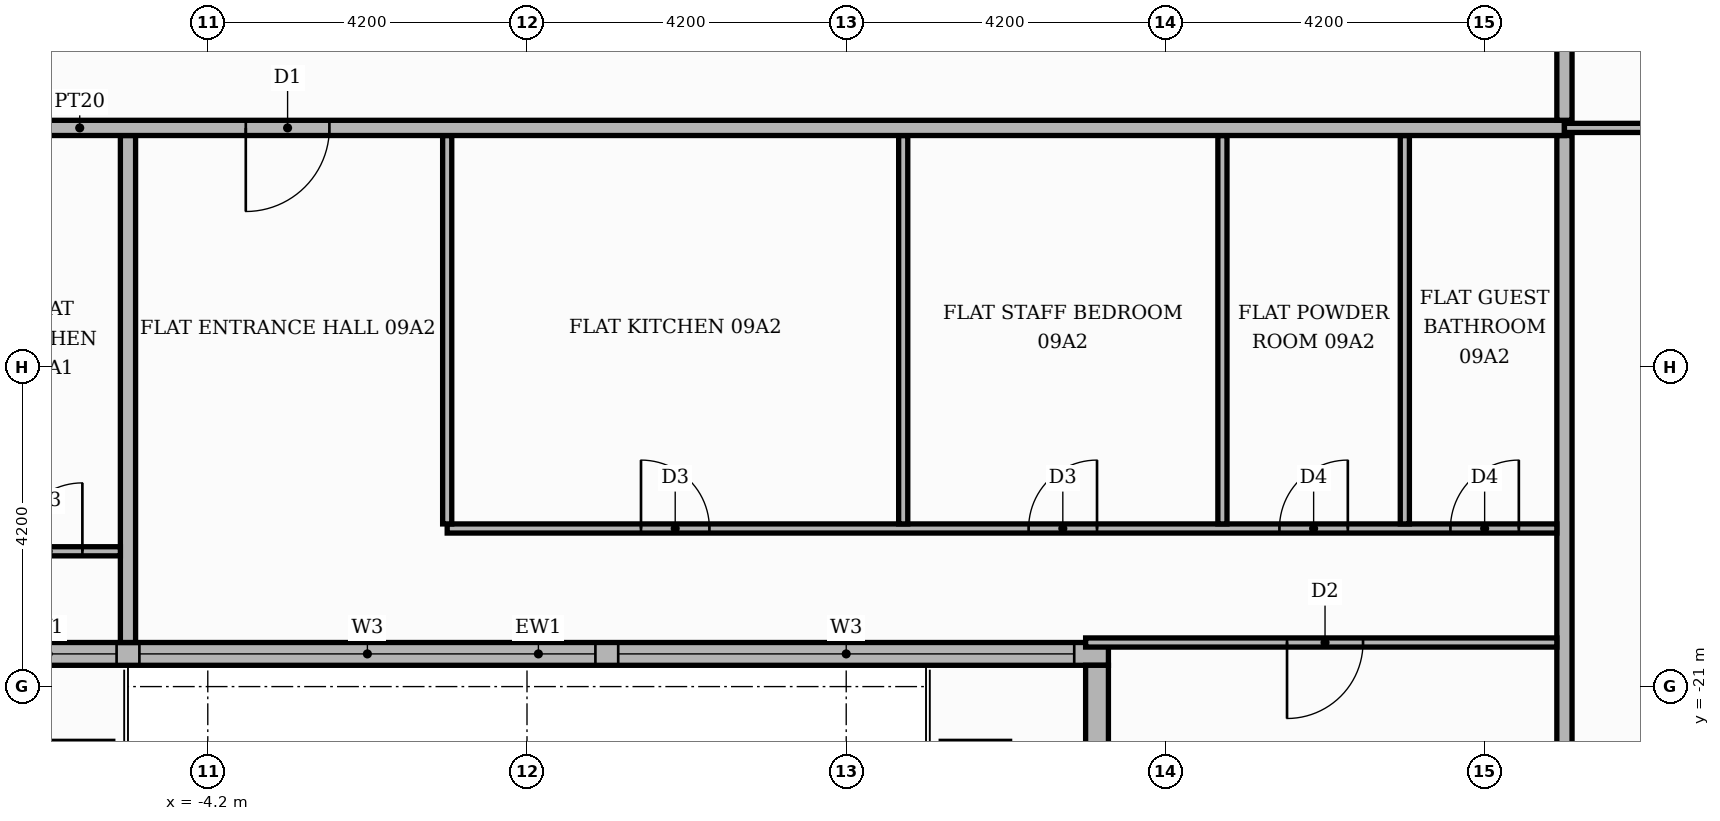
"""IFC4 building model, lengths in metres.
Left out: names, types, materials, properties, quantities, classifications, styles, units other than length and angle.
Written with IfcOpenShell. Run it as: python <this file> out.ifc"""

import sys

from ifc_helpers import new_model, si_unit, direction, frame, frame_2d, origin, place, context, subcontext, project, spatial, rectangle, extrude, element, fill, save


model = new_model("IFC4")
c1 = context("Model", 3, precision=1e-05, world=origin(), true_north=direction((0.0, 1.0)))
c2 = subcontext(c1, "Body", "Model", "MODEL_VIEW")
j1 = project(units=[si_unit("LENGTHUNIT", "METRE"), si_unit("PLANEANGLEUNIT", "RADIAN")], contexts=[c1])
p1 = place(None, origin())
s1 = spatial("IfcSite", under=j1, at=p1, CompositionType="ELEMENT")
p2 = place(p1, origin())
s2 = spatial("IfcBuilding", under=s1, at=p2, CompositionType="ELEMENT")
p3 = place(p2, frame((0.0, 0.0, 42.6)))
s3 = spatial("IfcBuildingStorey", under=s2, at=p3, CompositionType="ELEMENT", Elevation=42.6)
p4 = place(p3, frame((-7.35, -20.57, 0.0), z_axis=(0.0, 0.0, 1.0), x_axis=(1.0, 0.0, 0.0)))
e1 = element("IfcWall", 1, at=p4, inside=s3, PredefinedType="STANDARD", context=c2, shape_type="SweptSolid", body=[
    extrude(rectangle(XDim=15.0, YDim=0.3, at=frame_2d((7.5, 0.0))), origin(), (0.0, 0.0, 1.0), 3.48),
])
p5 = place(p4, frame((0.15, 0.0, 0.9)))
e2 = element("IfcOpeningElement", 2, at=p5, cuts=e1, PredefinedType="OPENING", context=c2, shape_type="SweptSolid", body=[
    extrude(rectangle(XDim=1.8, YDim=2.1, at=frame_2d((0.9, 1.05))), frame((0.0, 0.16, 0.0), z_axis=(0.0, -1.0, 0.0), x_axis=(1.0, 0.0, 0.0)), (0.0, 0.0, 1.0), 0.32),
])
p6 = place(p4, frame((2.25, 0.0, 0.9)))
e3 = element("IfcOpeningElement", 3, at=p6, cuts=e1, PredefinedType="OPENING", context=c2, shape_type="SweptSolid", body=[
    extrude(rectangle(XDim=6.0, YDim=2.1, at=frame_2d((3.0, 1.05))), frame((0.0, 0.16, 0.0), z_axis=(0.0, -1.0, 0.0), x_axis=(1.0, 0.0, 0.0)), (0.0, 0.0, 1.0), 0.32),
])
p7 = place(p4, frame((8.55, 0.0, 0.9)))
e4 = element("IfcOpeningElement", 4, at=p7, cuts=e1, PredefinedType="OPENING", context=c2, shape_type="SweptSolid", body=[
    extrude(rectangle(XDim=6.0, YDim=2.1, at=frame_2d((3.0, 1.05))), frame((0.0, 0.16, 0.0), z_axis=(0.0, -1.0, 0.0), x_axis=(1.0, 0.0, 0.0)), (0.0, 0.0, 1.0), 0.32),
])
p8 = place(p3, frame((7.5, -20.72, 0.0), z_axis=(0.0, 0.0, 1.0), x_axis=(0.0, -1.0, 0.0)))
e5 = element("IfcWall", 5, at=p8, inside=s3, PredefinedType="STANDARD", context=c2, shape_type="SweptSolid", body=[
    extrude(rectangle(XDim=5.0, YDim=0.3, at=frame_2d((2.5, 0.0))), origin(), (0.0, 0.0, 1.0), 3.48),
])
p9 = place(p8, frame((1.48, 0.0, 0.0)))
e6 = element("IfcOpeningElement", 6, at=p9, cuts=e5, PredefinedType="OPENING", context=c2, shape_type="SweptSolid", body=[
    extrude(rectangle(XDim=1.8, YDim=2.4, at=frame_2d((0.9, 1.2))), frame((0.0, 0.16, 0.0), z_axis=(0.0, -1.0, 0.0), x_axis=(1.0, 0.0, 0.0)), (0.0, 0.0, 1.0), 0.32),
])
p10 = place(p3, frame((13.65, -25.42, 0.0), z_axis=(0.0, 0.0, 1.0), x_axis=(0.0, 1.0, 0.0)))
e7 = element("IfcWall", 7, at=p10, inside=s3, PredefinedType="PARTITIONING", context=c2, shape_type="SweptSolid", body=[
    extrude(rectangle(XDim=11.67, YDim=0.2, at=frame_2d((5.835, 0.0))), origin(), (0.0, 0.0, 1.0), 3.48),
])
p11 = place(p3, frame((-5.25, -20.42, 0.0), z_axis=(0.0, 0.0, 1.0), x_axis=(0.0, 1.0, 0.0)))
e8 = element("IfcWall", 8, at=p11, inside=s3, PredefinedType="PARTITIONING", context=c2, shape_type="SweptSolid", body=[
    extrude(rectangle(XDim=6.67, YDim=0.2, at=frame_2d((3.335, 0.0))), origin(), (0.0, 0.0, 1.0), 3.48),
])
p12 = place(p3, frame((7.35, -20.42, 0.0), z_axis=(0.0, 0.0, 1.0), x_axis=(1.0, 0.0, 0.0)))
e9 = element("IfcWall", 9, at=p12, inside=s3, PredefinedType="PARTITIONING", context=c2, shape_type="SweptSolid", body=[
    extrude(rectangle(XDim=6.2, YDim=0.12, at=frame_2d((3.1, 0.0))), origin(), (0.0, 0.0, 1.0), 3.48),
])
p13 = place(p12, frame((2.65, 0.0, 0.0)))
e10 = element("IfcOpeningElement", 10, at=p13, cuts=e9, PredefinedType="OPENING", context=c2, shape_type="SweptSolid", body=[
    extrude(rectangle(XDim=1.0, YDim=2.1, at=frame_2d((0.5, 1.05))), frame((0.0, 0.07, 0.0), z_axis=(0.0, -1.0, 0.0), x_axis=(1.0, 0.0, 0.0)), (0.0, 0.0, 1.0), 0.14),
])
p14 = place(p3, frame((-9.45, -19.22, 0.0), z_axis=(0.0, 0.0, 1.0), x_axis=(1.0, 0.0, 0.0)))
e11 = element("IfcWall", 11, at=p14, inside=s3, PredefinedType="PARTITIONING", context=c2, shape_type="SweptSolid", body=[
    extrude(rectangle(XDim=4.1, YDim=0.12, at=frame_2d((2.05, 0.0))), origin(), (0.0, 0.0, 1.0), 3.48),
])
p15 = place(p14, frame((2.7, 0.0, 0.0)))
e12 = element("IfcOpeningElement", 12, at=p15, cuts=e11, PredefinedType="OPENING", context=c2, shape_type="SweptSolid", body=[
    extrude(rectangle(XDim=0.9, YDim=2.1, at=frame_2d((0.45, 1.05))), frame((0.0, 0.07, 0.0), z_axis=(0.0, -1.0, 0.0), x_axis=(1.0, 0.0, 0.0)), (0.0, 0.0, 1.0), 0.14),
])
p16 = place(p3, frame((-1.05, -18.92, 0.0), z_axis=(0.0, 0.0, 1.0), x_axis=(1.0, 0.0, 0.0)))
e13 = element("IfcWall", 13, at=p16, inside=s3, PredefinedType="PARTITIONING", context=c2, shape_type="SweptSolid", body=[
    extrude(rectangle(XDim=14.6, YDim=0.12, at=frame_2d((7.3, 0.0))), origin(), (0.0, 0.0, 1.0), 3.48),
])
p17 = place(p16, frame((2.55, 0.0, 0.0)))
e14 = element("IfcOpeningElement", 14, at=p17, cuts=e13, PredefinedType="OPENING", context=c2, shape_type="SweptSolid", body=[
    extrude(rectangle(XDim=0.9, YDim=2.1, at=frame_2d((0.45, 1.05))), frame((0.0, 0.07, 0.0), z_axis=(0.0, -1.0, 0.0), x_axis=(1.0, 0.0, 0.0)), (0.0, 0.0, 1.0), 0.14),
])
p18 = place(p16, frame((7.65, 0.0, 0.0)))
e15 = element("IfcOpeningElement", 15, at=p18, cuts=e13, PredefinedType="OPENING", context=c2, shape_type="SweptSolid", body=[
    extrude(rectangle(XDim=0.9, YDim=2.1, at=frame_2d((0.45, 1.05))), frame((0.0, 0.07, 0.0), z_axis=(0.0, -1.0, 0.0), x_axis=(1.0, 0.0, 0.0)), (0.0, 0.0, 1.0), 0.14),
])
p19 = place(p16, frame((10.95, 0.0, 0.0)))
e16 = element("IfcOpeningElement", 16, at=p19, cuts=e13, PredefinedType="OPENING", context=c2, shape_type="SweptSolid", body=[
    extrude(rectangle(XDim=0.9, YDim=2.1, at=frame_2d((0.45, 1.05))), frame((0.0, 0.07, 0.0), z_axis=(0.0, -1.0, 0.0), x_axis=(1.0, 0.0, 0.0)), (0.0, 0.0, 1.0), 0.14),
])
p20 = place(p16, frame((13.2, 0.0, 0.0)))
e17 = element("IfcOpeningElement", 17, at=p20, cuts=e13, PredefinedType="OPENING", context=c2, shape_type="SweptSolid", body=[
    extrude(rectangle(XDim=0.9, YDim=2.1, at=frame_2d((0.45, 1.05))), frame((0.0, 0.07, 0.0), z_axis=(0.0, -1.0, 0.0), x_axis=(1.0, 0.0, 0.0)), (0.0, 0.0, 1.0), 0.14),
])
for number, where, z_axis, x_axis in (
    (18, (-1.05, -18.86, 0.0), (0.0, 0.0, 1.0), (0.0, 1.0, 0.0)),
    (19, (4.95, -18.86, 0.0), (0.0, 0.0, 1.0), (0.0, 1.0, 0.0)),
    (20, (9.15, -18.86, 0.0), (0.0, 0.0, 1.0), (0.0, 1.0, 0.0)),
    (21, (11.55, -18.86, 0.0), (0.0, 0.0, 1.0), (0.0, 1.0, 0.0)),
):
    element("IfcWall", number, at=place(p3, frame(where, z_axis=z_axis, x_axis=x_axis)), inside=s3, PredefinedType="PARTITIONING", context=c2, shape_type="SweptSolid", body=[
        extrude(rectangle(XDim=5.11, YDim=0.12, at=frame_2d((2.555, 0.0))), origin(), (0.0, 0.0, 1.0), 3.48),
    ])
p21 = place(p3, frame((-25.42, -13.65, 0.0), z_axis=(0.0, 0.0, 1.0), x_axis=(1.0, 0.0, 0.0)))
e22 = element("IfcWall", 22, at=p21, inside=s3, PredefinedType="PARTITIONING", context=c2, shape_type="SweptSolid", body=[
    extrude(rectangle(XDim=39.07, YDim=0.2, at=frame_2d((19.535, 0.0))), origin(), (0.0, 0.0, 1.0), 3.48),
])
p22 = place(p21, frame((13.32, 0.0, 0.0)))
e23 = element("IfcOpeningElement", 23, at=p22, cuts=e22, PredefinedType="OPENING", context=c2, shape_type="SweptSolid", body=[
    extrude(rectangle(XDim=1.1, YDim=2.4, at=frame_2d((0.55, 1.2))), frame((0.0, 0.11, 0.0), z_axis=(0.0, -1.0, 0.0), x_axis=(1.0, 0.0, 0.0)), (0.0, 0.0, 1.0), 0.22),
])
p23 = place(p21, frame((21.72, 0.0, 0.0)))
e24 = element("IfcOpeningElement", 24, at=p23, cuts=e22, PredefinedType="OPENING", context=c2, shape_type="SweptSolid", body=[
    extrude(rectangle(XDim=1.1, YDim=2.4, at=frame_2d((0.55, 1.2))), frame((0.0, 0.11, 0.0), z_axis=(0.0, -1.0, 0.0), x_axis=(1.0, 0.0, 0.0)), (0.0, 0.0, 1.0), 0.22),
])
p24 = place(p3, frame((13.65, -13.65, 0.0), z_axis=(0.0, 0.0, 1.0), x_axis=(1.0, 0.0, 0.0)))
e25 = element("IfcWall", 25, at=p24, inside=s3, PredefinedType="PARTITIONING", context=c2, shape_type="SweptSolid", body=[
    extrude(rectangle(XDim=6.77, YDim=0.12, at=frame_2d((3.385, 0.0))), origin(), (0.0, 0.0, 1.0), 3.48),
])
p25 = place(p24, frame((2.885, 0.0, 0.0)))
e26 = element("IfcOpeningElement", 26, at=p25, cuts=e25, PredefinedType="OPENING", context=c2, shape_type="SweptSolid", body=[
    extrude(rectangle(XDim=1.0, YDim=2.1, at=frame_2d((0.5, 1.05))), frame((0.0, 0.07, 0.0), z_axis=(0.0, -1.0, 0.0), x_axis=(1.0, 0.0, 0.0)), (0.0, 0.0, 1.0), 0.14),
])
p26 = place(p3, frame((13.65, -13.55, 0.0), z_axis=(0.0, 0.0, 1.0), x_axis=(0.0, 1.0, 0.0)))
e27 = element("IfcWall", 27, at=p26, inside=s3, PredefinedType="PARTITIONING", context=c2, shape_type="SweptSolid", body=[
    extrude(rectangle(XDim=27.1, YDim=0.2, at=frame_2d((13.55, 0.0))), origin(), (0.0, 0.0, 1.0), 3.48),
])
p27 = place(p26, frame((2.5, 0.0, 0.0)))
e28 = element("IfcOpeningElement", 28, at=p27, cuts=e27, PredefinedType="OPENING", context=c2, shape_type="SweptSolid", body=[
    extrude(rectangle(XDim=1.1, YDim=2.4, at=frame_2d((0.55, 1.2))), frame((0.0, 0.11, 0.0), z_axis=(0.0, -1.0, 0.0), x_axis=(1.0, 0.0, 0.0)), (0.0, 0.0, 1.0), 0.22),
])
p28 = place(p5, origin())
e29 = element("IfcWindow", 29, at=p28, inside=s3, PartitioningType="SINGLE_PANEL", PredefinedType="WINDOW", context=c2, shape_type="SweptSolid", body=[
    extrude(rectangle(XDim=1.8, YDim=2.1, at=frame_2d((0.9, 1.05))), frame((0.0, 0.03, 0.0), z_axis=(0.0, -1.0, 0.0), x_axis=(1.0, 0.0, 0.0)), (0.0, 0.0, 1.0), 0.06),
])
fill(e2, e29)
p29 = place(p6, origin())
e30 = element("IfcWindow", 30, at=p29, inside=s3, PartitioningType="SINGLE_PANEL", PredefinedType="WINDOW", context=c2, shape_type="SweptSolid", body=[
    extrude(rectangle(XDim=6.0, YDim=2.1, at=frame_2d((3.0, 1.05))), frame((0.0, 0.03, 0.0), z_axis=(0.0, -1.0, 0.0), x_axis=(1.0, 0.0, 0.0)), (0.0, 0.0, 1.0), 0.06),
])
fill(e3, e30)
p30 = place(p7, origin())
e31 = element("IfcWindow", 31, at=p30, inside=s3, PartitioningType="SINGLE_PANEL", PredefinedType="WINDOW", context=c2, shape_type="SweptSolid", body=[
    extrude(rectangle(XDim=6.0, YDim=2.1, at=frame_2d((3.0, 1.05))), frame((0.0, 0.03, 0.0), z_axis=(0.0, -1.0, 0.0), x_axis=(1.0, 0.0, 0.0)), (0.0, 0.0, 1.0), 0.06),
])
fill(e4, e31)
p31 = place(p15, origin())
e32 = element("IfcDoor", 32, at=p31, inside=s3, OperationType="SINGLE_SWING_RIGHT", PredefinedType="DOOR", context=c2, shape_type="SweptSolid", body=[
    extrude(rectangle(XDim=0.9, YDim=2.1, at=frame_2d((0.45, 1.05))), frame((0.0, 0.025, 0.0), z_axis=(0.0, -1.0, 0.0), x_axis=(1.0, 0.0, 0.0)), (0.0, 0.0, 1.0), 0.05),
])
fill(e12, e32)
p32 = place(p23, frame((1.1, 0.0, 0.0), z_axis=(0.0, 0.0, 1.0), x_axis=(-1.0, 0.0, 0.0)))
e33 = element("IfcDoor", 33, at=p32, inside=s3, OperationType="SINGLE_SWING_LEFT", PredefinedType="DOOR", context=c2, shape_type="SweptSolid", body=[
    extrude(rectangle(XDim=1.1, YDim=2.4, at=frame_2d((0.55, 1.2))), frame((0.0, 0.025, 0.0), z_axis=(0.0, -1.0, 0.0), x_axis=(1.0, 0.0, 0.0)), (0.0, 0.0, 1.0), 0.05),
])
fill(e24, e33)
p33 = place(p17, origin())
e34 = element("IfcDoor", 34, at=p33, inside=s3, OperationType="SINGLE_SWING_LEFT", PredefinedType="DOOR", context=c2, shape_type="SweptSolid", body=[
    extrude(rectangle(XDim=0.9, YDim=2.1, at=frame_2d((0.45, 1.05))), frame((0.0, 0.025, 0.0), z_axis=(0.0, -1.0, 0.0), x_axis=(1.0, 0.0, 0.0)), (0.0, 0.0, 1.0), 0.05),
])
fill(e14, e34)
p34 = place(p18, origin())
e35 = element("IfcDoor", 35, at=p34, inside=s3, OperationType="SINGLE_SWING_RIGHT", PredefinedType="DOOR", context=c2, shape_type="SweptSolid", body=[
    extrude(rectangle(XDim=0.9, YDim=2.1, at=frame_2d((0.45, 1.05))), frame((0.0, 0.025, 0.0), z_axis=(0.0, -1.0, 0.0), x_axis=(1.0, 0.0, 0.0)), (0.0, 0.0, 1.0), 0.05),
])
fill(e15, e35)
p35 = place(p19, origin())
e36 = element("IfcDoor", 36, at=p35, inside=s3, OperationType="SINGLE_SWING_RIGHT", PredefinedType="DOOR", context=c2, shape_type="SweptSolid", body=[
    extrude(rectangle(XDim=0.9, YDim=2.1, at=frame_2d((0.45, 1.05))), frame((0.0, 0.025, 0.0), z_axis=(0.0, -1.0, 0.0), x_axis=(1.0, 0.0, 0.0)), (0.0, 0.0, 1.0), 0.05),
])
fill(e16, e36)
p36 = place(p20, origin())
e37 = element("IfcDoor", 37, at=p36, inside=s3, OperationType="SINGLE_SWING_RIGHT", PredefinedType="DOOR", context=c2, shape_type="SweptSolid", body=[
    extrude(rectangle(XDim=0.9, YDim=2.1, at=frame_2d((0.45, 1.05))), frame((0.0, 0.025, 0.0), z_axis=(0.0, -1.0, 0.0), x_axis=(1.0, 0.0, 0.0)), (0.0, 0.0, 1.0), 0.05),
])
fill(e17, e37)
p37 = place(p13, frame((1.0, 0.0, 0.0), z_axis=(0.0, 0.0, 1.0), x_axis=(-1.0, 0.0, 0.0)))
e38 = element("IfcDoor", 38, at=p37, inside=s3, OperationType="SINGLE_SWING_LEFT", PredefinedType="DOOR", context=c2, shape_type="SweptSolid", body=[
    extrude(rectangle(XDim=1.0, YDim=2.1, at=frame_2d((0.5, 1.05))), frame((0.0, 0.025, 0.0), z_axis=(0.0, -1.0, 0.0), x_axis=(1.0, 0.0, 0.0)), (0.0, 0.0, 1.0), 0.05),
])
fill(e10, e38)
save(model, sys.argv[1])
